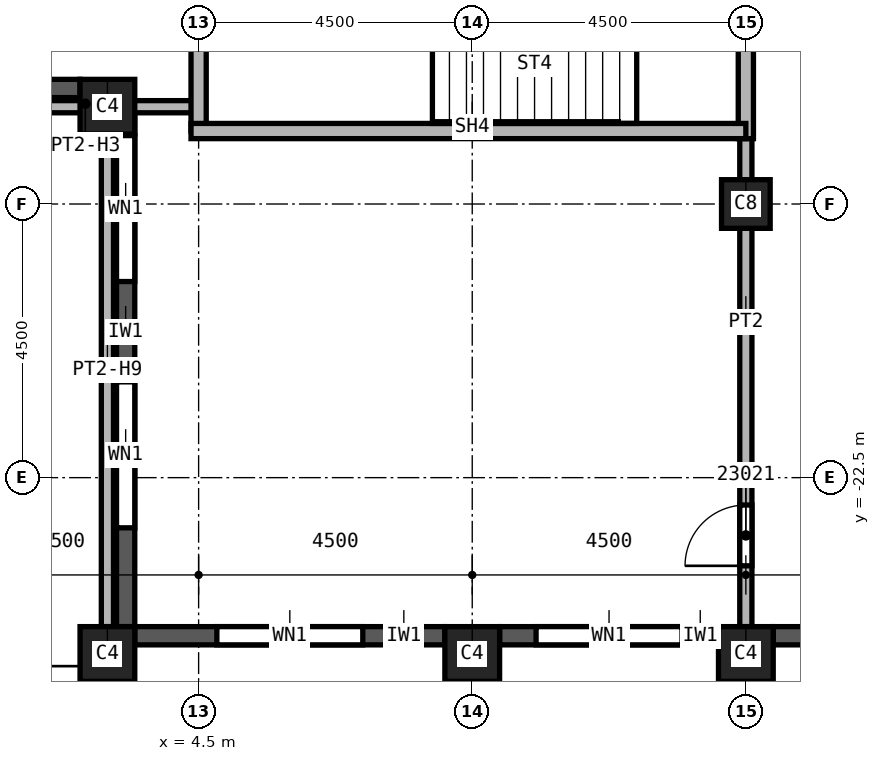
"""IFC4 building model, lengths in metres.
Left out: names, types, materials, properties, quantities, classifications, styles, units other than length and angle.
Written with IfcOpenShell. Run it as: python <this file> out.ifc"""

import sys

from ifc_helpers import new_model, si_unit, direction, frame, frame_2d, origin, origin_2d, place, context, subcontext, project, spatial, rectangle, extrude, element, fill, save


model = new_model("IFC4")
c1 = context("Model", 3, precision=1e-05, world=origin(), true_north=direction((0.0, 1.0)))
c2 = subcontext(c1, "Body", "Model", "MODEL_VIEW")
j1 = project(units=[si_unit("LENGTHUNIT", "METRE"), si_unit("PLANEANGLEUNIT", "RADIAN")], contexts=[c1])
p1 = place(None, origin())
s1 = spatial("IfcSite", under=j1, at=p1, CompositionType="ELEMENT")
p2 = place(p1, origin())
s2 = spatial("IfcBuilding", under=s1, at=p2, CompositionType="ELEMENT")
p3 = place(p2, frame((0.0, 0.0, 326.0)))
s3 = spatial("IfcBuildingStorey", under=s2, at=p3, CompositionType="ELEMENT", Elevation=326.0)
p4 = place(p3, frame((13.5, -18.0, 0.0), z_axis=(0.0, 0.0, 1.0), x_axis=(1.0, 0.0, 0.0)))
e1 = element("IfcColumn", 1, at=p4, inside=s3, PredefinedType="COLUMN", context=c2, shape_type="SweptSolid", body=[
    extrude(rectangle(XDim=0.8, YDim=0.8, at=origin_2d()), origin(), (0.0, 0.0, 1.0), 3.74),
])
for number, where, z_axis, x_axis in (
    (2, (3.0, -25.4, 0.0), (0.0, 0.0, 1.0), (1.0, 0.0, 0.0)),
    (3, (9.0, -25.4, 0.0), (0.0, 0.0, 1.0), (1.0, 0.0, 0.0)),
    (4, (13.5, -25.4, 0.0), (0.0, 0.0, 1.0), (1.0, 0.0, 0.0)),
    (5, (3.0, -16.4, 0.0), (0.0, 0.0, 1.0), (1.0, 0.0, 0.0)),
):
    element("IfcColumn", number, at=place(p3, frame(where, z_axis=z_axis, x_axis=x_axis)), inside=s3, PredefinedType="COLUMN", context=c2, shape_type="SweptSolid", body=[
        extrude(rectangle(XDim=0.9, YDim=0.9, at=origin_2d()), origin(), (0.0, 0.0, 1.0), 3.74),
    ])
p5 = place(p3, frame((2.55, -16.1, 0.0), z_axis=(0.0, 0.0, 1.0), x_axis=(-1.0, 0.0, 0.0)))
e6 = element("IfcWall", 6, at=p5, inside=s3, PredefinedType="SOLIDWALL", context=c2, shape_type="SweptSolid", body=[
    extrude(rectangle(XDim=5.1, YDim=0.3, at=frame_2d((2.55, 0.0))), origin(), (0.0, 0.0, 1.0), 3.14),
])
p6 = place(p5, frame((1.95, 0.0, 0.0)))
e7 = element("IfcOpeningElement", 7, at=p6, cuts=e6, PredefinedType="OPENING", context=c2, shape_type="SweptSolid", body=[
    extrude(rectangle(XDim=1.2, YDim=2.4, at=frame_2d((0.6, 1.2))), frame((0.0, 0.15, 0.0), z_axis=(0.0, -1.0, 0.0), x_axis=(1.0, 0.0, 0.0)), (0.0, 0.0, 1.0), 0.3),
])
p7 = place(p3, frame((3.3, -16.45, 0.0), z_axis=(0.0, 0.0, 1.0), x_axis=(0.0, -1.0, 0.0)))
e8 = element("IfcWall", 8, at=p7, inside=s3, PredefinedType="SOLIDWALL", context=c2, shape_type="SweptSolid", body=[
    extrude(rectangle(XDim=8.5, YDim=0.3, at=frame_2d((4.25, 0.0))), origin(), (0.0, 0.0, 1.0), 3.14),
])
p8 = place(p7, frame((0.425, 0.0, 0.8)))
e9 = element("IfcOpeningElement", 9, at=p8, cuts=e8, PredefinedType="OPENING", context=c2, shape_type="SweptSolid", body=[
    extrude(rectangle(XDim=2.4, YDim=1.95, at=frame_2d((1.2, 0.975))), frame((0.0, 0.15, 0.0), z_axis=(0.0, -1.0, 0.0), x_axis=(1.0, 0.0, 0.0)), (0.0, 0.0, 1.0), 0.3),
])
p9 = place(p7, frame((4.475, 0.0, 0.8)))
e10 = element("IfcOpeningElement", 10, at=p9, cuts=e8, PredefinedType="OPENING", context=c2, shape_type="SweptSolid", body=[
    extrude(rectangle(XDim=2.4, YDim=1.95, at=frame_2d((1.2, 0.975))), frame((0.0, 0.15, 0.0), z_axis=(0.0, -1.0, 0.0), x_axis=(1.0, 0.0, 0.0)), (0.0, 0.0, 1.0), 0.3),
])
p10 = place(p3, frame((3.45, -25.1, 0.0), z_axis=(0.0, 0.0, 1.0), x_axis=(1.0, 0.0, 0.0)))
e11 = element("IfcWall", 11, at=p10, inside=s3, PredefinedType="SOLIDWALL", context=c2, shape_type="SweptSolid", body=[
    extrude(rectangle(XDim=5.1, YDim=0.3, at=frame_2d((2.55, 0.0))), origin(), (0.0, 0.0, 1.0), 3.14),
])
p11 = place(p10, frame((1.35, 0.0, 0.8)))
e12 = element("IfcOpeningElement", 12, at=p11, cuts=e11, PredefinedType="OPENING", context=c2, shape_type="SweptSolid", body=[
    extrude(rectangle(XDim=2.4, YDim=1.95, at=frame_2d((1.2, 0.975))), frame((0.0, 0.15, 0.0), z_axis=(0.0, -1.0, 0.0), x_axis=(1.0, 0.0, 0.0)), (0.0, 0.0, 1.0), 0.3),
])
p12 = place(p3, frame((9.45, -25.1, 0.0), z_axis=(0.0, 0.0, 1.0), x_axis=(1.0, 0.0, 0.0)))
e13 = element("IfcWall", 13, at=p12, inside=s3, PredefinedType="SOLIDWALL", context=c2, shape_type="SweptSolid", body=[
    extrude(rectangle(XDim=3.6, YDim=0.3, at=frame_2d((1.8, 0.0))), origin(), (0.0, 0.0, 1.0), 3.14),
])
p13 = place(p12, frame((0.6, 0.0, 0.8)))
e14 = element("IfcOpeningElement", 14, at=p13, cuts=e13, PredefinedType="OPENING", context=c2, shape_type="SweptSolid", body=[
    extrude(rectangle(XDim=2.4, YDim=1.95, at=frame_2d((1.2, 0.975))), frame((0.0, 0.15, 0.0), z_axis=(0.0, -1.0, 0.0), x_axis=(1.0, 0.0, 0.0)), (0.0, 0.0, 1.0), 0.3),
])
p14 = place(p3, frame((13.95, -25.1, 0.0), z_axis=(0.0, 0.0, 1.0), x_axis=(1.0, 0.0, 0.0)))
e15 = element("IfcWall", 15, at=p14, inside=s3, PredefinedType="SOLIDWALL", context=c2, shape_type="SweptSolid", body=[
    extrude(rectangle(XDim=3.6, YDim=0.3, at=frame_2d((1.8, 0.0))), origin(), (0.0, 0.0, 1.0), 3.14),
])
p15 = place(p14, frame((0.625, 0.0, 0.8)))
e16 = element("IfcOpeningElement", 16, at=p15, cuts=e15, PredefinedType="OPENING", context=c2, shape_type="SweptSolid", body=[
    extrude(rectangle(XDim=0.6, YDim=1.95, at=frame_2d((0.3, 0.975))), frame((0.0, 0.15, 0.0), z_axis=(0.0, -1.0, 0.0), x_axis=(1.0, 0.0, 0.0)), (0.0, 0.0, 1.0), 0.3),
])
p16 = place(p14, frame((1.825, 0.0, 0.8)))
e17 = element("IfcOpeningElement", 17, at=p16, cuts=e15, PredefinedType="OPENING", context=c2, shape_type="SweptSolid", body=[
    extrude(rectangle(XDim=1.0, YDim=1.95, at=frame_2d((0.5, 0.975))), frame((0.0, 0.15, 0.0), z_axis=(0.0, -1.0, 0.0), x_axis=(1.0, 0.0, 0.0)), (0.0, 0.0, 1.0), 0.3),
])
p17 = place(p3, frame((3.0, -16.4, 0.0), z_axis=(0.0, 0.0, 1.0), x_axis=(0.0, -1.0, 0.0)))
e18 = element("IfcWall", 18, at=p17, inside=s3, PredefinedType="PARTITIONING", context=c2, shape_type="SweptSolid", body=[
    extrude(rectangle(XDim=8.55, YDim=0.2, at=frame_2d((4.275, 0.0))), origin(), (0.0, 0.0, 1.0), 2.894),
])
p18 = place(p3, frame((4.5, -16.4, 0.0), z_axis=(0.0, 0.0, 1.0), x_axis=(-1.0, 0.0, 0.0)))
e19 = element("IfcWall", 19, at=p18, inside=s3, PredefinedType="PARTITIONING", context=c2, shape_type="SweptSolid", body=[
    extrude(rectangle(XDim=3.6, YDim=0.2, at=frame_2d((1.8, 0.0))), origin(), (0.0, 0.0, 1.0), 3.204),
])
p19 = place(p3, frame((13.5, -24.95, 0.0), z_axis=(0.0, 0.0, 1.0), x_axis=(0.0, 1.0, 0.0)))
e20 = element("IfcWall", 20, at=p19, inside=s3, PredefinedType="PARTITIONING", context=c2, shape_type="SweptSolid", body=[
    extrude(rectangle(XDim=8.275, YDim=0.2, at=frame_2d((4.137, 0.0))), origin(), (0.0, 0.0, 1.0), 3.74),
])
p20 = place(p19, frame((1.0, 0.0, 0.0)))
e21 = element("IfcOpeningElement", 21, at=p20, cuts=e20, PredefinedType="OPENING", context=c2, shape_type="SweptSolid", body=[
    extrude(rectangle(XDim=1.0, YDim=2.1, at=frame_2d((0.5, 1.05))), frame((0.0, 0.1, 0.0), z_axis=(0.0, -1.0, 0.0), x_axis=(1.0, 0.0, 0.0)), (0.0, 0.0, 1.0), 0.2),
])
p21 = place(p3, frame((4.5, -16.8, 0.0), z_axis=(0.0, 0.0, 1.0), x_axis=(0.0, 1.0, 0.0)))
e22 = element("IfcWall", 22, at=p21, inside=s3, PredefinedType="SOLIDWALL", context=c2, shape_type="SweptSolid", body=[
    extrude(rectangle(XDim=4.5, YDim=0.25, at=frame_2d((2.25, 0.0))), origin(), (0.0, 0.0, 1.0), 3.74),
])
p22 = place(p3, frame((13.5, -16.925, 0.0), z_axis=(0.0, 0.0, 1.0), x_axis=(0.0, 1.0, 0.0)))
e23 = element("IfcWall", 23, at=p22, inside=s3, PredefinedType="SOLIDWALL", context=c2, shape_type="SweptSolid", body=[
    extrude(rectangle(XDim=4.75, YDim=0.25, at=frame_2d((2.375, 0.0))), origin(), (0.0, 0.0, 1.0), 3.74),
])
p23 = place(p3, frame((13.5, -16.8, 0.0), z_axis=(0.0, 0.0, 1.0), x_axis=(-1.0, 0.0, 0.0)))
e24 = element("IfcWall", 24, at=p23, inside=s3, PredefinedType="SOLIDWALL", context=c2, shape_type="SweptSolid", body=[
    extrude(rectangle(XDim=9.125, YDim=0.25, at=frame_2d((4.562, 0.0))), origin(), (0.0, 0.0, 1.0), 3.74),
])
p24 = place(p8, origin())
e25 = element("IfcWindow", 25, at=p24, inside=s3, PartitioningType="SINGLE_PANEL", PredefinedType="WINDOW", context=c2, shape_type="SweptSolid", body=[
    extrude(rectangle(XDim=2.4, YDim=1.95, at=frame_2d((1.2, 0.975))), frame((0.0, 0.03, 0.0), z_axis=(0.0, -1.0, 0.0), x_axis=(1.0, 0.0, 0.0)), (0.0, 0.0, 1.0), 0.06),
])
fill(e9, e25)
p25 = place(p9, origin())
e26 = element("IfcWindow", 26, at=p25, inside=s3, PartitioningType="SINGLE_PANEL", PredefinedType="WINDOW", context=c2, shape_type="SweptSolid", body=[
    extrude(rectangle(XDim=2.4, YDim=1.95, at=frame_2d((1.2, 0.975))), frame((0.0, 0.03, 0.0), z_axis=(0.0, -1.0, 0.0), x_axis=(1.0, 0.0, 0.0)), (0.0, 0.0, 1.0), 0.06),
])
fill(e10, e26)
p26 = place(p11, origin())
e27 = element("IfcWindow", 27, at=p26, inside=s3, PartitioningType="SINGLE_PANEL", PredefinedType="WINDOW", context=c2, shape_type="SweptSolid", body=[
    extrude(rectangle(XDim=2.4, YDim=1.95, at=frame_2d((1.2, 0.975))), frame((0.0, 0.03, 0.0), z_axis=(0.0, -1.0, 0.0), x_axis=(1.0, 0.0, 0.0)), (0.0, 0.0, 1.0), 0.06),
])
fill(e12, e27)
p27 = place(p13, origin())
e28 = element("IfcWindow", 28, at=p27, inside=s3, PartitioningType="SINGLE_PANEL", PredefinedType="WINDOW", context=c2, shape_type="SweptSolid", body=[
    extrude(rectangle(XDim=2.4, YDim=1.95, at=frame_2d((1.2, 0.975))), frame((0.0, 0.03, 0.0), z_axis=(0.0, -1.0, 0.0), x_axis=(1.0, 0.0, 0.0)), (0.0, 0.0, 1.0), 0.06),
])
fill(e14, e28)
p28 = place(p20, origin())
e29 = element("IfcDoor", 29, at=p28, inside=s3, OperationType="SINGLE_SWING_RIGHT", PredefinedType="DOOR", context=c2, shape_type="SweptSolid", body=[
    extrude(rectangle(XDim=1.0, YDim=2.1, at=frame_2d((0.5, 1.05))), frame((0.0, 0.025, 0.0), z_axis=(0.0, -1.0, 0.0), x_axis=(1.0, 0.0, 0.0)), (0.0, 0.0, 1.0), 0.05),
])
fill(e21, e29)
save(model, sys.argv[1])
